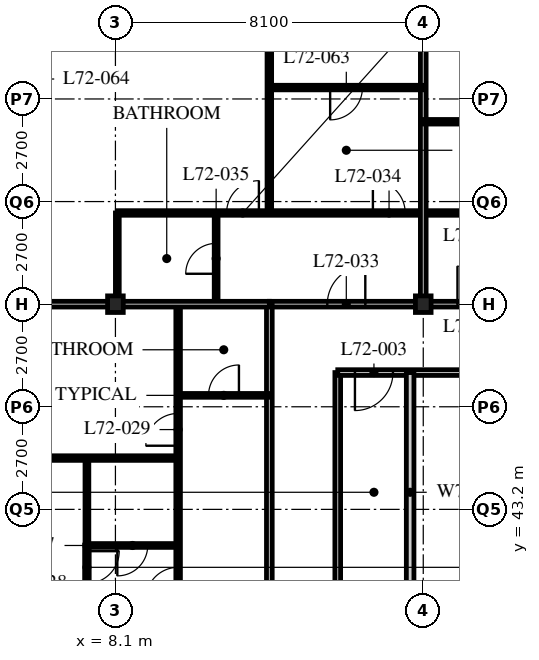
"""IFC4 building model, lengths in metres.
Left out: names, types, materials, properties, quantities, classifications, styles, units other than length and angle.
Written with IfcOpenShell. Run it as: python <this file> out.ifc"""

import sys

from ifc_helpers import new_model, si_unit, direction, frame, frame_2d, origin, origin_2d, place, context, subcontext, project, spatial, rectangle, i_section, extrude, element, fill, save


model = new_model("IFC4")
c1 = context("Model", 3, precision=1e-05, world=origin(), true_north=direction((0.0, 1.0)))
c2 = subcontext(c1, "Body", "Model", "MODEL_VIEW")
j1 = project(units=[si_unit("LENGTHUNIT", "METRE"), si_unit("PLANEANGLEUNIT", "RADIAN")], contexts=[c1])
p1 = place(None, origin())
s1 = spatial("IfcSite", under=j1, at=p1, CompositionType="ELEMENT")
p2 = place(p1, origin())
s2 = spatial("IfcBuilding", under=s1, at=p2, CompositionType="ELEMENT")
p3 = place(p2, frame((0.0, 0.0, 281.4)))
s3 = spatial("IfcBuildingStorey", under=s2, at=p3, CompositionType="ELEMENT", Elevation=281.4)
for number, where, z_axis, x_axis in (
    (1, (8.1, 48.6, 0.0), (0.0, 0.0, 1.0), (1.0, 0.0, 0.0)),
    (2, (16.2, 48.6, 0.0), (0.0, 0.0, 1.0), (1.0, 0.0, 0.0)),
):
    element("IfcColumn", number, at=place(p3, frame(where, z_axis=z_axis, x_axis=x_axis)), inside=s3, PredefinedType="COLUMN", context=c2, shape_type="SweptSolid", body=[
        extrude(i_section(OverallWidth=0.412, OverallDepth=0.437, WebThickness=0.036, FlangeThickness=0.058, FilletRadius=0.015, at=origin_2d()), origin(), (0.0, 0.0, 1.0), 3.9),
    ])
p4 = place(p3, frame((12.15, 48.6, 0.0), z_axis=(0.0, 0.0, 1.0), x_axis=(1.0, 0.0, 0.0)))
e3 = element("IfcWall", 3, at=p4, inside=s3, PredefinedType="PARTITIONING", context=c2, shape_type="SweptSolid", body=[
    extrude(rectangle(XDim=24.3, YDim=0.15, at=frame_2d((12.15, 0.0))), origin(), (0.0, 0.0, 1.0), 3.078),
])
p5 = place(p4, frame((4.95, 0.0, 0.0)))
e4 = element("IfcOpeningElement", 4, at=p5, cuts=e3, PredefinedType="OPENING", context=c2, shape_type="SweptSolid", body=[
    extrude(rectangle(XDim=1.0, YDim=2.1, at=frame_2d((0.5, 1.05))), frame((0.0, 0.085, 0.0), z_axis=(0.0, -1.0, 0.0), x_axis=(1.0, 0.0, 0.0)), (0.0, 0.0, 1.0), 0.17),
])
p6 = place(p4, frame((16.6, 0.0, 0.0)))
e5 = element("IfcOpeningElement", 5, at=p6, cuts=e3, PredefinedType="OPENING", context=c2, shape_type="SweptSolid", body=[
    extrude(rectangle(XDim=1.0, YDim=2.1, at=frame_2d((0.5, 1.05))), frame((0.0, 0.085, 0.0), z_axis=(0.0, -1.0, 0.0), x_axis=(1.0, 0.0, 0.0)), (0.0, 0.0, 1.0), 0.17),
])
p7 = place(p4, frame((1.525, 0.0, 0.0)))
e6 = element("IfcOpeningElement", 6, at=p7, cuts=e3, PredefinedType="OPENING", context=c2, shape_type="SweptSolid", body=[
    extrude(rectangle(XDim=1.0, YDim=2.1, at=frame_2d((0.5, 1.05))), frame((0.0, 0.085, 0.0), z_axis=(0.0, -1.0, 0.0), x_axis=(1.0, 0.0, 0.0)), (0.0, 0.0, 1.0), 0.17),
])
p8 = place(p3, frame((12.15, 22.5, 0.0), z_axis=(0.0, 0.0, 1.0), x_axis=(0.0, 1.0, 0.0)))
e7 = element("IfcWall", 7, at=p8, inside=s3, PredefinedType="PARTITIONING", context=c2, shape_type="SweptSolid", body=[
    extrude(rectangle(XDim=26.1, YDim=0.15, at=frame_2d((13.05, 0.0))), origin(), (0.0, 0.0, 1.0), 3.69),
])
p9 = place(p8, frame((0.4, 0.0, 0.0)))
e8 = element("IfcOpeningElement", 8, at=p9, cuts=e7, PredefinedType="OPENING", context=c2, shape_type="SweptSolid", body=[
    extrude(rectangle(XDim=1.0, YDim=2.1, at=frame_2d((0.5, 1.05))), frame((0.0, 0.085, 0.0), z_axis=(0.0, -1.0, 0.0), x_axis=(1.0, 0.0, 0.0)), (0.0, 0.0, 1.0), 0.17),
])
p10 = place(p3, frame((13.95, 24.3, 0.0), z_axis=(0.0, 0.0, 1.0), x_axis=(0.0, 1.0, 0.0)))
e9 = element("IfcWall", 9, at=p10, inside=s3, PredefinedType="PARTITIONING", context=c2, shape_type="SweptSolid", body=[
    extrude(rectangle(XDim=22.5, YDim=0.15, at=frame_2d((11.25, 0.0))), origin(), (0.0, 0.0, 1.0), 3.69),
])
p11 = place(p10, frame((3.55, 0.0, 0.0)))
e10 = element("IfcOpeningElement", 10, at=p11, cuts=e9, PredefinedType="OPENING", context=c2, shape_type="SweptSolid", body=[
    extrude(rectangle(XDim=1.0, YDim=2.1, at=frame_2d((0.5, 1.05))), frame((0.0, 0.085, 0.0), z_axis=(0.0, -1.0, 0.0), x_axis=(1.0, 0.0, 0.0)), (0.0, 0.0, 1.0), 0.17),
])
p12 = place(p10, frame((11.65, 0.0, 0.0)))
e11 = element("IfcOpeningElement", 11, at=p12, cuts=e9, PredefinedType="OPENING", context=c2, shape_type="SweptSolid", body=[
    extrude(rectangle(XDim=1.0, YDim=2.1, at=frame_2d((0.5, 1.05))), frame((0.0, 0.085, 0.0), z_axis=(0.0, -1.0, 0.0), x_axis=(1.0, 0.0, 0.0)), (0.0, 0.0, 1.0), 0.17),
])
p13 = place(p3, frame((13.95, 46.8, 0.0), z_axis=(0.0, 0.0, 1.0), x_axis=(1.0, 0.0, 0.0)))
e12 = element("IfcWall", 12, at=p13, inside=s3, PredefinedType="PARTITIONING", context=c2, shape_type="SweptSolid", body=[
    extrude(rectangle(XDim=13.19, YDim=0.15, at=frame_2d((6.595, 0.0))), origin(), (0.0, 0.0, 1.0), 3.69),
])
p14 = place(p13, frame((0.452, 0.0, 0.0)))
e13 = element("IfcOpeningElement", 13, at=p14, cuts=e12, PredefinedType="OPENING", context=c2, shape_type="SweptSolid", body=[
    extrude(rectangle(XDim=1.0, YDim=2.1, at=frame_2d((0.5, 1.05))), frame((0.0, 0.085, 0.0), z_axis=(0.0, -1.0, 0.0), x_axis=(1.0, 0.0, 0.0)), (0.0, 0.0, 1.0), 0.17),
])
p15 = place(p13, frame((7.052, 0.0, 0.0)))
e14 = element("IfcOpeningElement", 14, at=p15, cuts=e12, PredefinedType="OPENING", context=c2, shape_type="SweptSolid", body=[
    extrude(rectangle(XDim=1.0, YDim=2.1, at=frame_2d((0.5, 1.05))), frame((0.0, 0.085, 0.0), z_axis=(0.0, -1.0, 0.0), x_axis=(1.0, 0.0, 0.0)), (0.0, 0.0, 1.0), 0.17),
])
p16 = place(p3, frame((15.855, 46.8, 0.0), z_axis=(0.0, 0.0, 1.0), x_axis=(0.0, -1.0, 0.0)))
e15 = element("IfcWall", 15, at=p16, inside=s3, PredefinedType="SOLIDWALL", context=c2, shape_type="SweptSolid", body=[
    extrude(rectangle(XDim=6.3, YDim=0.2, at=frame_2d((3.15, 0.0))), origin(), (0.0, 0.0, 1.0), 3.69),
])
p17 = place(p3, frame((9.75, 22.5, 0.0), z_axis=(0.0, 0.0, 1.0), x_axis=(0.0, 1.0, 0.0)))
e16 = element("IfcWall", 16, at=p17, inside=s3, PredefinedType="PARTITIONING", context=c2, shape_type="SweptSolid", body=[
    extrude(rectangle(XDim=26.1, YDim=0.12, at=frame_2d((13.05, 0.0))), origin(), (0.0, 0.0, 1.0), 3.69),
])
p18 = place(p17, frame((0.975, 0.0, 0.0)))
e17 = element("IfcOpeningElement", 17, at=p18, cuts=e16, PredefinedType="OPENING", context=c2, shape_type="SweptSolid", body=[
    extrude(rectangle(XDim=0.85, YDim=2.1, at=frame_2d((0.425, 1.05))), frame((0.0, 0.07, 0.0), z_axis=(0.0, -1.0, 0.0), x_axis=(1.0, 0.0, 0.0)), (0.0, 0.0, 1.0), 0.14),
])
p19 = place(p17, frame((10.225, 0.0, 0.0)))
e18 = element("IfcOpeningElement", 18, at=p19, cuts=e16, PredefinedType="OPENING", context=c2, shape_type="SweptSolid", body=[
    extrude(rectangle(XDim=0.85, YDim=2.1, at=frame_2d((0.425, 1.05))), frame((0.0, 0.07, 0.0), z_axis=(0.0, -1.0, 0.0), x_axis=(1.0, 0.0, 0.0)), (0.0, 0.0, 1.0), 0.14),
])
p20 = place(p17, frame((14.275, 0.0, 0.0)))
e19 = element("IfcOpeningElement", 19, at=p20, cuts=e16, PredefinedType="OPENING", context=c2, shape_type="SweptSolid", body=[
    extrude(rectangle(XDim=0.85, YDim=2.1, at=frame_2d((0.425, 1.05))), frame((0.0, 0.07, 0.0), z_axis=(0.0, -1.0, 0.0), x_axis=(1.0, 0.0, 0.0)), (0.0, 0.0, 1.0), 0.14),
])
p21 = place(p17, frame((18.325, 0.0, 0.0)))
e20 = element("IfcOpeningElement", 20, at=p21, cuts=e16, PredefinedType="OPENING", context=c2, shape_type="SweptSolid", body=[
    extrude(rectangle(XDim=0.85, YDim=2.1, at=frame_2d((0.425, 1.05))), frame((0.0, 0.07, 0.0), z_axis=(0.0, -1.0, 0.0), x_axis=(1.0, 0.0, 0.0)), (0.0, 0.0, 1.0), 0.14),
])
p22 = place(p17, frame((22.375, 0.0, 0.0)))
e21 = element("IfcOpeningElement", 21, at=p22, cuts=e16, PredefinedType="OPENING", context=c2, shape_type="SweptSolid", body=[
    extrude(rectangle(XDim=0.85, YDim=2.1, at=frame_2d((0.425, 1.05))), frame((0.0, 0.07, 0.0), z_axis=(0.0, -1.0, 0.0), x_axis=(1.0, 0.0, 0.0)), (0.0, 0.0, 1.0), 0.14),
])
p23 = place(p3, frame((12.15, 46.2, 0.0), z_axis=(0.0, 0.0, 1.0), x_axis=(-1.0, 0.0, 0.0)))
e22 = element("IfcWall", 22, at=p23, inside=s3, PredefinedType="PARTITIONING", context=c2, shape_type="SweptSolid", body=[
    extrude(rectangle(XDim=2.4, YDim=0.1, at=frame_2d((1.2, 0.0))), origin(), (0.0, 0.0, 1.0), 3.69),
])
p24 = place(p23, frame((0.8, 0.0, 0.0)))
e23 = element("IfcOpeningElement", 23, at=p24, cuts=e22, PredefinedType="OPENING", context=c2, shape_type="SweptSolid", body=[
    extrude(rectangle(XDim=0.8, YDim=2.1, at=frame_2d((0.4, 1.05))), frame((0.0, 0.06, 0.0), z_axis=(0.0, -1.0, 0.0), x_axis=(1.0, 0.0, 0.0)), (0.0, 0.0, 1.0), 0.12),
])
p25 = place(p3, frame((9.75, 42.25, 0.0), z_axis=(0.0, 0.0, 1.0), x_axis=(-1.0, 0.0, 0.0)))
e24 = element("IfcWall", 24, at=p25, inside=s3, PredefinedType="PARTITIONING", context=c2, shape_type="SweptSolid", body=[
    extrude(rectangle(XDim=2.4, YDim=0.1, at=frame_2d((1.2, 0.0))), origin(), (0.0, 0.0, 1.0), 3.69),
])
p26 = place(p25, frame((0.8, 0.0, 0.0)))
e25 = element("IfcOpeningElement", 25, at=p26, cuts=e24, PredefinedType="OPENING", context=c2, shape_type="SweptSolid", body=[
    extrude(rectangle(XDim=0.8, YDim=2.1, at=frame_2d((0.4, 1.05))), frame((0.0, 0.06, 0.0), z_axis=(0.0, -1.0, 0.0), x_axis=(1.0, 0.0, 0.0)), (0.0, 0.0, 1.0), 0.12),
])
p27 = place(p3, frame((7.35, 42.25, 0.0), z_axis=(0.0, 0.0, 1.0), x_axis=(0.0, 1.0, 0.0)))
e26 = element("IfcWall", 26, at=p27, inside=s3, PredefinedType="PARTITIONING", context=c2, shape_type="SweptSolid", body=[
    extrude(rectangle(XDim=2.3, YDim=0.1, at=frame_2d((1.15, 0.0))), origin(), (0.0, 0.0, 1.0), 3.69),
])
p28 = place(p3, frame((9.75, 44.55, 0.0), z_axis=(0.0, 0.0, 1.0), x_axis=(-1.0, 0.0, 0.0)))
e27 = element("IfcWall", 27, at=p28, inside=s3, PredefinedType="PARTITIONING", context=c2, shape_type="SweptSolid", body=[
    extrude(rectangle(XDim=9.45, YDim=0.12, at=frame_2d((4.725, 0.0))), origin(), (0.0, 0.0, 1.0), 3.69),
])
p29 = place(p3, frame((10.75, 48.6, 0.0), z_axis=(0.0, 0.0, 1.0), x_axis=(0.0, 1.0, 0.0)))
e28 = element("IfcWall", 28, at=p29, inside=s3, PredefinedType="PARTITIONING", context=c2, shape_type="SweptSolid", body=[
    extrude(rectangle(XDim=2.4, YDim=0.1, at=frame_2d((1.2, 0.0))), origin(), (0.0, 0.0, 1.0), 3.69),
])
p30 = place(p29, frame((0.8, 0.0, 0.0)))
e29 = element("IfcOpeningElement", 29, at=p30, cuts=e28, PredefinedType="OPENING", context=c2, shape_type="SweptSolid", body=[
    extrude(rectangle(XDim=0.8, YDim=2.1, at=frame_2d((0.4, 1.05))), frame((0.0, 0.06, 0.0), z_axis=(0.0, -1.0, 0.0), x_axis=(1.0, 0.0, 0.0)), (0.0, 0.0, 1.0), 0.12),
])
p31 = place(p3, frame((8.15, 48.6, 0.0), z_axis=(0.0, 0.0, 1.0), x_axis=(0.0, 1.0, 0.0)))
e30 = element("IfcWall", 30, at=p31, inside=s3, PredefinedType="PARTITIONING", context=c2, shape_type="SweptSolid", body=[
    extrude(rectangle(XDim=2.4, YDim=0.1, at=frame_2d((1.2, 0.0))), origin(), (0.0, 0.0, 1.0), 3.078),
])
p32 = place(p3, frame((8.15, 51.0, 0.0), z_axis=(0.0, 0.0, 1.0), x_axis=(1.0, 0.0, 0.0)))
e31 = element("IfcWall", 31, at=p32, inside=s3, PredefinedType="PARTITIONING", context=c2, shape_type="SweptSolid", body=[
    extrude(rectangle(XDim=28.3, YDim=0.12, at=frame_2d((14.15, 0.0))), origin(), (0.0, 0.0, 1.0), 3.69),
])
p33 = place(p32, frame((9.025, 0.0, 0.0)))
e32 = element("IfcOpeningElement", 32, at=p33, cuts=e31, PredefinedType="OPENING", context=c2, shape_type="SweptSolid", body=[
    extrude(rectangle(XDim=0.85, YDim=2.1, at=frame_2d((0.425, 1.05))), frame((0.0, 0.07, 0.0), z_axis=(0.0, -1.0, 0.0), x_axis=(1.0, 0.0, 0.0)), (0.0, 0.0, 1.0), 0.14),
])
p34 = place(p32, frame((16.475, 0.0, 0.0)))
e33 = element("IfcOpeningElement", 33, at=p34, cuts=e31, PredefinedType="OPENING", context=c2, shape_type="SweptSolid", body=[
    extrude(rectangle(XDim=0.85, YDim=2.1, at=frame_2d((0.425, 1.05))), frame((0.0, 0.07, 0.0), z_axis=(0.0, -1.0, 0.0), x_axis=(1.0, 0.0, 0.0)), (0.0, 0.0, 1.0), 0.14),
])
p35 = place(p32, frame((21.175, 0.0, 0.0)))
e34 = element("IfcOpeningElement", 34, at=p35, cuts=e31, PredefinedType="OPENING", context=c2, shape_type="SweptSolid", body=[
    extrude(rectangle(XDim=0.85, YDim=2.1, at=frame_2d((0.425, 1.05))), frame((0.0, 0.07, 0.0), z_axis=(0.0, -1.0, 0.0), x_axis=(1.0, 0.0, 0.0)), (0.0, 0.0, 1.0), 0.14),
])
p36 = place(p32, frame((24.575, 0.0, 0.0)))
e35 = element("IfcOpeningElement", 35, at=p36, cuts=e31, PredefinedType="OPENING", context=c2, shape_type="SweptSolid", body=[
    extrude(rectangle(XDim=0.85, YDim=2.1, at=frame_2d((0.425, 1.05))), frame((0.0, 0.07, 0.0), z_axis=(0.0, -1.0, 0.0), x_axis=(1.0, 0.0, 0.0)), (0.0, 0.0, 1.0), 0.14),
])
p37 = place(p32, frame((6.725, 0.0, 0.0)))
e36 = element("IfcOpeningElement", 36, at=p37, cuts=e31, PredefinedType="OPENING", context=c2, shape_type="SweptSolid", body=[
    extrude(rectangle(XDim=0.85, YDim=2.1, at=frame_2d((0.425, 1.05))), frame((0.0, 0.07, 0.0), z_axis=(0.0, -1.0, 0.0), x_axis=(1.0, 0.0, 0.0)), (0.0, 0.0, 1.0), 0.14),
])
p38 = place(p32, frame((2.875, 0.0, 0.0)))
e37 = element("IfcOpeningElement", 37, at=p38, cuts=e31, PredefinedType="OPENING", context=c2, shape_type="SweptSolid", body=[
    extrude(rectangle(XDim=0.85, YDim=2.1, at=frame_2d((0.425, 1.05))), frame((0.0, 0.07, 0.0), z_axis=(0.0, -1.0, 0.0), x_axis=(1.0, 0.0, 0.0)), (0.0, 0.0, 1.0), 0.14),
])
p39 = place(p3, frame((12.15, 51.0, 0.0), z_axis=(0.0, 0.0, 1.0), x_axis=(0.0, 1.0, 0.0)))
e38 = element("IfcWall", 38, at=p39, inside=s3, PredefinedType="PARTITIONING", context=c2, shape_type="SweptSolid", body=[
    extrude(rectangle(XDim=13.5, YDim=0.12, at=frame_2d((6.75, 0.0))), origin(), (0.0, 0.0, 1.0), 3.69),
])
p40 = place(p3, frame((0.3, 48.6, 0.0), z_axis=(0.0, 0.0, 1.0), x_axis=(1.0, 0.0, 0.0)))
e39 = element("IfcWall", 39, at=p40, inside=s3, PredefinedType="PARTITIONING", context=c2, shape_type="SweptSolid", body=[
    extrude(rectangle(XDim=11.85, YDim=0.15, at=frame_2d((5.925, 0.0))), origin(), (0.0, 0.0, 1.0), 3.078),
])
p41 = place(p3, frame((16.2, 48.6, 0.0), z_axis=(0.0, 0.0, 1.0), x_axis=(0.0, 1.0, 0.0)))
e40 = element("IfcWall", 40, at=p41, inside=s3, PredefinedType="PARTITIONING", context=c2, shape_type="SweptSolid", body=[
    extrude(rectangle(XDim=15.9, YDim=0.15, at=frame_2d((7.95, 0.0))), origin(), (0.0, 0.0, 1.0), 3.078),
])
p42 = place(p3, frame((7.35, 40.5, 0.0), z_axis=(0.0, 0.0, 1.0), x_axis=(0.0, 1.0, 0.0)))
e41 = element("IfcWall", 41, at=p42, inside=s3, PredefinedType="PARTITIONING", context=c2, shape_type="SweptSolid", body=[
    extrude(rectangle(XDim=1.76, YDim=0.12, at=frame_2d((0.88, 0.0))), origin(), (0.0, 0.0, 1.0), 3.69),
])
p43 = place(p42, frame((0.75, 0.0, 0.0)))
e42 = element("IfcOpeningElement", 42, at=p43, cuts=e41, PredefinedType="OPENING", context=c2, shape_type="SweptSolid", body=[
    extrude(rectangle(XDim=0.85, YDim=2.1, at=frame_2d((0.425, 1.05))), frame((0.0, 0.07, 0.0), z_axis=(0.0, -1.0, 0.0), x_axis=(1.0, 0.0, 0.0)), (0.0, 0.0, 1.0), 0.14),
])
p44 = place(p3, frame((16.2, 53.4, 0.0), z_axis=(0.0, 0.0, 1.0), x_axis=(1.0, 0.0, 0.0)))
e43 = element("IfcWall", 43, at=p44, inside=s3, PredefinedType="PARTITIONING", context=c2, shape_type="SweptSolid", body=[
    extrude(rectangle(XDim=8.1, YDim=0.12, at=frame_2d((4.05, 0.0))), origin(), (0.0, 0.0, 1.0), 3.69),
])
p45 = place(p44, frame((3.625, 0.0, 0.0)))
e44 = element("IfcOpeningElement", 44, at=p45, cuts=e43, PredefinedType="OPENING", context=c2, shape_type="SweptSolid", body=[
    extrude(rectangle(XDim=0.85, YDim=2.1, at=frame_2d((0.425, 1.05))), frame((0.0, 0.07, 0.0), z_axis=(0.0, -1.0, 0.0), x_axis=(1.0, 0.0, 0.0)), (0.0, 0.0, 1.0), 0.14),
])
p46 = place(p3, frame((12.15, 54.3, 0.0), z_axis=(0.0, 0.0, 1.0), x_axis=(1.0, 0.0, 0.0)))
e45 = element("IfcWall", 45, at=p46, inside=s3, PredefinedType="PARTITIONING", context=c2, shape_type="SweptSolid", body=[
    extrude(rectangle(XDim=4.05, YDim=0.12, at=frame_2d((2.025, 0.0))), origin(), (0.0, 0.0, 1.0), 3.69),
])
p47 = place(p46, frame((1.6, 0.0, 0.0)))
e46 = element("IfcOpeningElement", 46, at=p47, cuts=e45, PredefinedType="OPENING", context=c2, shape_type="SweptSolid", body=[
    extrude(rectangle(XDim=0.85, YDim=2.1, at=frame_2d((0.425, 1.05))), frame((0.0, 0.07, 0.0), z_axis=(0.0, -1.0, 0.0), x_axis=(1.0, 0.0, 0.0)), (0.0, 0.0, 1.0), 0.14),
])
p48 = place(p14, origin())
e47 = element("IfcDoor", 47, at=p48, inside=s3, OperationType="SINGLE_SWING_RIGHT", PredefinedType="DOOR", context=c2, shape_type="SweptSolid", body=[
    extrude(rectangle(XDim=1.0, YDim=2.1, at=frame_2d((0.5, 1.05))), frame((0.0, 0.025, 0.0), z_axis=(0.0, -1.0, 0.0), x_axis=(1.0, 0.0, 0.0)), (0.0, 0.0, 1.0), 0.05),
])
fill(e13, e47)
p49 = place(p5, origin())
e48 = element("IfcDoor", 48, at=p49, inside=s3, OperationType="SINGLE_SWING_LEFT", PredefinedType="DOOR", context=c2, shape_type="SweptSolid", body=[
    extrude(rectangle(XDim=1.0, YDim=2.1, at=frame_2d((0.5, 1.05))), frame((0.0, 0.025, 0.0), z_axis=(0.0, -1.0, 0.0), x_axis=(1.0, 0.0, 0.0)), (0.0, 0.0, 1.0), 0.05),
])
fill(e4, e48)
p50 = place(p24, origin())
e49 = element("IfcDoor", 49, at=p50, inside=s3, OperationType="SINGLE_SWING_RIGHT", PredefinedType="DOOR", context=c2, shape_type="SweptSolid", body=[
    extrude(rectangle(XDim=0.8, YDim=2.1, at=frame_2d((0.4, 1.05))), frame((0.0, 0.025, 0.0), z_axis=(0.0, -1.0, 0.0), x_axis=(1.0, 0.0, 0.0)), (0.0, 0.0, 1.0), 0.05),
])
fill(e23, e49)
p51 = place(p26, origin())
e50 = element("IfcDoor", 50, at=p51, inside=s3, OperationType="SINGLE_SWING_RIGHT", PredefinedType="DOOR", context=c2, shape_type="SweptSolid", body=[
    extrude(rectangle(XDim=0.8, YDim=2.1, at=frame_2d((0.4, 1.05))), frame((0.0, 0.025, 0.0), z_axis=(0.0, -1.0, 0.0), x_axis=(1.0, 0.0, 0.0)), (0.0, 0.0, 1.0), 0.05),
])
fill(e25, e50)
p52 = place(p21, origin())
e51 = element("IfcDoor", 51, at=p52, inside=s3, OperationType="SINGLE_SWING_LEFT", PredefinedType="DOOR", context=c2, shape_type="SweptSolid", body=[
    extrude(rectangle(XDim=0.85, YDim=2.1, at=frame_2d((0.425, 1.05))), frame((0.0, 0.025, 0.0), z_axis=(0.0, -1.0, 0.0), x_axis=(1.0, 0.0, 0.0)), (0.0, 0.0, 1.0), 0.05),
])
fill(e20, e51)
p53 = place(p22, origin())
e52 = element("IfcDoor", 52, at=p53, inside=s3, OperationType="SINGLE_SWING_LEFT", PredefinedType="DOOR", context=c2, shape_type="SweptSolid", body=[
    extrude(rectangle(XDim=0.85, YDim=2.1, at=frame_2d((0.425, 1.05))), frame((0.0, 0.025, 0.0), z_axis=(0.0, -1.0, 0.0), x_axis=(1.0, 0.0, 0.0)), (0.0, 0.0, 1.0), 0.05),
])
fill(e21, e52)
p54 = place(p7, origin())
e53 = element("IfcDoor", 53, at=p54, inside=s3, OperationType="SINGLE_SWING_RIGHT", PredefinedType="DOOR", context=c2, shape_type="SweptSolid", body=[
    extrude(rectangle(XDim=1.0, YDim=2.1, at=frame_2d((0.5, 1.05))), frame((0.0, 0.025, 0.0), z_axis=(0.0, -1.0, 0.0), x_axis=(1.0, 0.0, 0.0)), (0.0, 0.0, 1.0), 0.05),
])
fill(e6, e53)
p55 = place(p37, origin())
e54 = element("IfcDoor", 54, at=p55, inside=s3, OperationType="SINGLE_SWING_LEFT", PredefinedType="DOOR", context=c2, shape_type="SweptSolid", body=[
    extrude(rectangle(XDim=0.85, YDim=2.1, at=frame_2d((0.425, 1.05))), frame((0.0, 0.025, 0.0), z_axis=(0.0, -1.0, 0.0), x_axis=(1.0, 0.0, 0.0)), (0.0, 0.0, 1.0), 0.05),
])
fill(e36, e54)
p56 = place(p30, origin())
e55 = element("IfcDoor", 55, at=p56, inside=s3, OperationType="SINGLE_SWING_LEFT", PredefinedType="DOOR", context=c2, shape_type="SweptSolid", body=[
    extrude(rectangle(XDim=0.8, YDim=2.1, at=frame_2d((0.4, 1.05))), frame((0.0, 0.025, 0.0), z_axis=(0.0, -1.0, 0.0), x_axis=(1.0, 0.0, 0.0)), (0.0, 0.0, 1.0), 0.05),
])
fill(e29, e55)
p57 = place(p38, origin())
e56 = element("IfcDoor", 56, at=p57, inside=s3, OperationType="SINGLE_SWING_RIGHT", PredefinedType="DOOR", context=c2, shape_type="SweptSolid", body=[
    extrude(rectangle(XDim=0.85, YDim=2.1, at=frame_2d((0.425, 1.05))), frame((0.0, 0.025, 0.0), z_axis=(0.0, -1.0, 0.0), x_axis=(1.0, 0.0, 0.0)), (0.0, 0.0, 1.0), 0.05),
])
fill(e37, e56)
p58 = place(p43, origin())
e57 = element("IfcDoor", 57, at=p58, inside=s3, OperationType="SINGLE_SWING_LEFT", PredefinedType="DOOR", context=c2, shape_type="SweptSolid", body=[
    extrude(rectangle(XDim=0.85, YDim=2.1, at=frame_2d((0.425, 1.05))), frame((0.0, 0.025, 0.0), z_axis=(0.0, -1.0, 0.0), x_axis=(1.0, 0.0, 0.0)), (0.0, 0.0, 1.0), 0.05),
])
fill(e42, e57)
p59 = place(p47, origin())
e58 = element("IfcDoor", 58, at=p59, inside=s3, OperationType="SINGLE_SWING_RIGHT", PredefinedType="DOOR", context=c2, shape_type="SweptSolid", body=[
    extrude(rectangle(XDim=0.85, YDim=2.1, at=frame_2d((0.425, 1.05))), frame((0.0, 0.025, 0.0), z_axis=(0.0, -1.0, 0.0), x_axis=(1.0, 0.0, 0.0)), (0.0, 0.0, 1.0), 0.05),
])
fill(e46, e58)
save(model, sys.argv[1])
